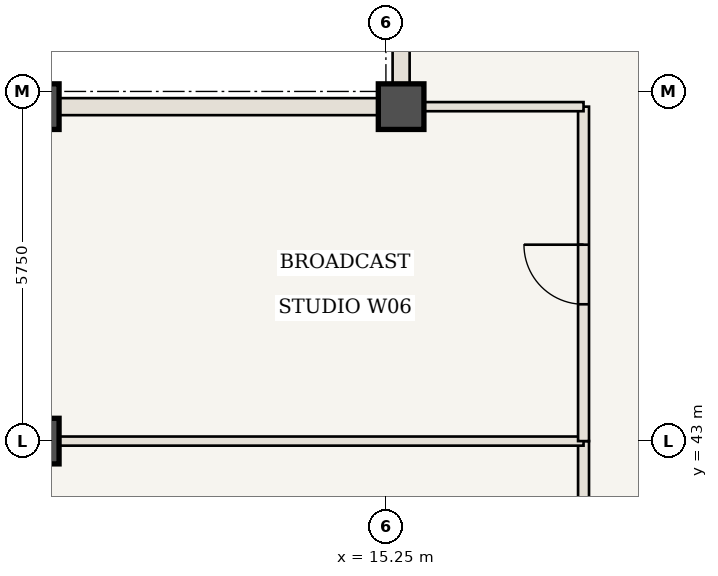
"""IFC4 building model, lengths in metres.
Left out: names, types, materials, properties, quantities, classifications, styles, units other than length and angle.
Written with IfcOpenShell. Run it as: python <this file> out.ifc"""

import sys

from ifc_helpers import new_model, si_unit, direction, frame, frame_2d, origin, origin_2d, place, context, subcontext, project, spatial, rectangle, extrude, element, fill, save


model = new_model("IFC4")
c1 = context("Model", 3, precision=1e-05, world=origin(), true_north=direction((0.0, 1.0)))
c2 = subcontext(c1, "Body", "Model", "MODEL_VIEW")
j1 = project(units=[si_unit("LENGTHUNIT", "METRE"), si_unit("PLANEANGLEUNIT", "RADIAN")], contexts=[c1])
p1 = place(None, origin())
s1 = spatial("IfcSite", under=j1, at=p1, CompositionType="ELEMENT")
p2 = place(p1, origin())
s2 = spatial("IfcBuilding", under=s1, at=p2, CompositionType="ELEMENT")
p3 = place(p2, frame((0.0, 0.0, 304.5)))
s3 = spatial("IfcBuildingStorey", under=s2, at=p3, CompositionType="ELEMENT", Elevation=304.5)
for number, where, z_axis, x_axis in (
    (1, (15.5, 48.5, 0.0), (0.0, 0.0, 1.0), (1.0, 0.0, 0.0)),
    (2, (9.5, 48.5, 0.0), (0.0, 0.0, 1.0), (1.0, 0.0, 0.0)),
    (3, (9.5, 43.0, 0.0), (0.0, 0.0, 1.0), (1.0, 0.0, 0.0)),
):
    element("IfcColumn", number, at=place(p3, frame(where, z_axis=z_axis, x_axis=x_axis)), inside=s3, PredefinedType="COLUMN", context=c2, shape_type="SweptSolid", body=[
        extrude(rectangle(XDim=0.75, YDim=0.75, at=origin_2d()), origin(), (0.0, 0.0, 1.0), 3.85),
    ])
p4 = place(p3, frame((18.5, 37.4, 0.0), z_axis=(0.0, 0.0, 1.0), x_axis=(0.0, 1.0, 0.0)))
e4 = element("IfcWall", 4, at=p4, inside=s3, PredefinedType="STANDARD", context=c2, shape_type="SweptSolid", body=[
    extrude(rectangle(XDim=5.6, YDim=0.18, at=frame_2d((2.8, 0.0))), origin(), (0.0, 0.0, 1.0), 3.63),
])
p5 = place(p4, frame((2.3, 0.0, 0.0)))
e5 = element("IfcOpeningElement", 5, at=p5, cuts=e4, PredefinedType="OPENING", context=c2, shape_type="SweptSolid", body=[
    extrude(rectangle(XDim=0.98, YDim=2.2, at=frame_2d((0.49, 1.1))), frame((0.0, 0.1, 0.0), z_axis=(0.0, -1.0, 0.0), x_axis=(1.0, 0.0, 0.0)), (0.0, 0.0, 1.0), 0.2),
])
p6 = place(p3, frame((9.56, 43.0, 0.0), z_axis=(0.0, 0.0, 1.0), x_axis=(1.0, 0.0, 0.0)))
e6 = element("IfcWall", 6, at=p6, inside=s3, PredefinedType="STANDARD", context=c2, shape_type="SweptSolid", body=[
    extrude(rectangle(XDim=8.94, YDim=0.15, at=frame_2d((4.47, 0.0))), origin(), (0.0, 0.0, 1.0), 3.63),
])
p7 = place(p3, frame((18.5, 43.0, 0.0), z_axis=(0.0, 0.0, 1.0), x_axis=(0.0, 1.0, 0.0)))
e7 = element("IfcWall", 7, at=p7, inside=s3, PredefinedType="STANDARD", context=c2, shape_type="SweptSolid", body=[
    extrude(rectangle(XDim=5.5, YDim=0.18, at=frame_2d((2.75, 0.0))), origin(), (0.0, 0.0, 1.0), 3.63),
])
p8 = place(p7, frame((2.25, 0.0, 0.0)))
e8 = element("IfcOpeningElement", 8, at=p8, cuts=e7, PredefinedType="OPENING", context=c2, shape_type="SweptSolid", body=[
    extrude(rectangle(XDim=0.98, YDim=2.2, at=frame_2d((0.49, 1.1))), frame((0.0, 0.1, 0.0), z_axis=(0.0, -1.0, 0.0), x_axis=(1.0, 0.0, 0.0)), (0.0, 0.0, 1.0), 0.2),
])
p9 = place(p3, frame((15.5, 48.5, 0.0), z_axis=(0.0, 0.0, 1.0), x_axis=(1.0, 0.0, 0.0)))
e9 = element("IfcWall", 9, at=p9, inside=s3, PredefinedType="STANDARD", context=c2, shape_type="SweptSolid", body=[
    extrude(rectangle(XDim=3.0, YDim=0.15, at=frame_2d((1.5, 0.0))), origin(), (0.0, 0.0, 1.0), 3.63),
])
for number, where, z_axis, x_axis in (
    (10, (15.5, 48.5, 0.0), (0.0, 0.0, 1.0), (0.0, 1.0, 0.0)),
    (11, (9.5, 48.5, 0.0), (0.0, 0.0, 1.0), (1.0, 0.0, 0.0)),
):
    element("IfcWall", number, at=place(p3, frame(where, z_axis=z_axis, x_axis=x_axis)), inside=s3, PredefinedType="USERDEFINED", context=c2, shape_type="SweptSolid", body=[
        extrude(rectangle(XDim=6.0, YDim=0.28, at=frame_2d((3.0, 0.0))), origin(), (0.0, 0.0, 1.0), 2.93),
    ])
p10 = place(p8, origin())
e12 = element("IfcDoor", 12, at=p10, inside=s3, OperationType="SINGLE_SWING_RIGHT", PredefinedType="DOOR", context=c2, shape_type="SweptSolid", body=[
    extrude(rectangle(XDim=0.98, YDim=2.2, at=frame_2d((0.49, 1.1))), frame((0.0, 0.025, 0.0), z_axis=(0.0, -1.0, 0.0), x_axis=(1.0, 0.0, 0.0)), (0.0, 0.0, 1.0), 0.05),
])
fill(e8, e12)
save(model, sys.argv[1])
